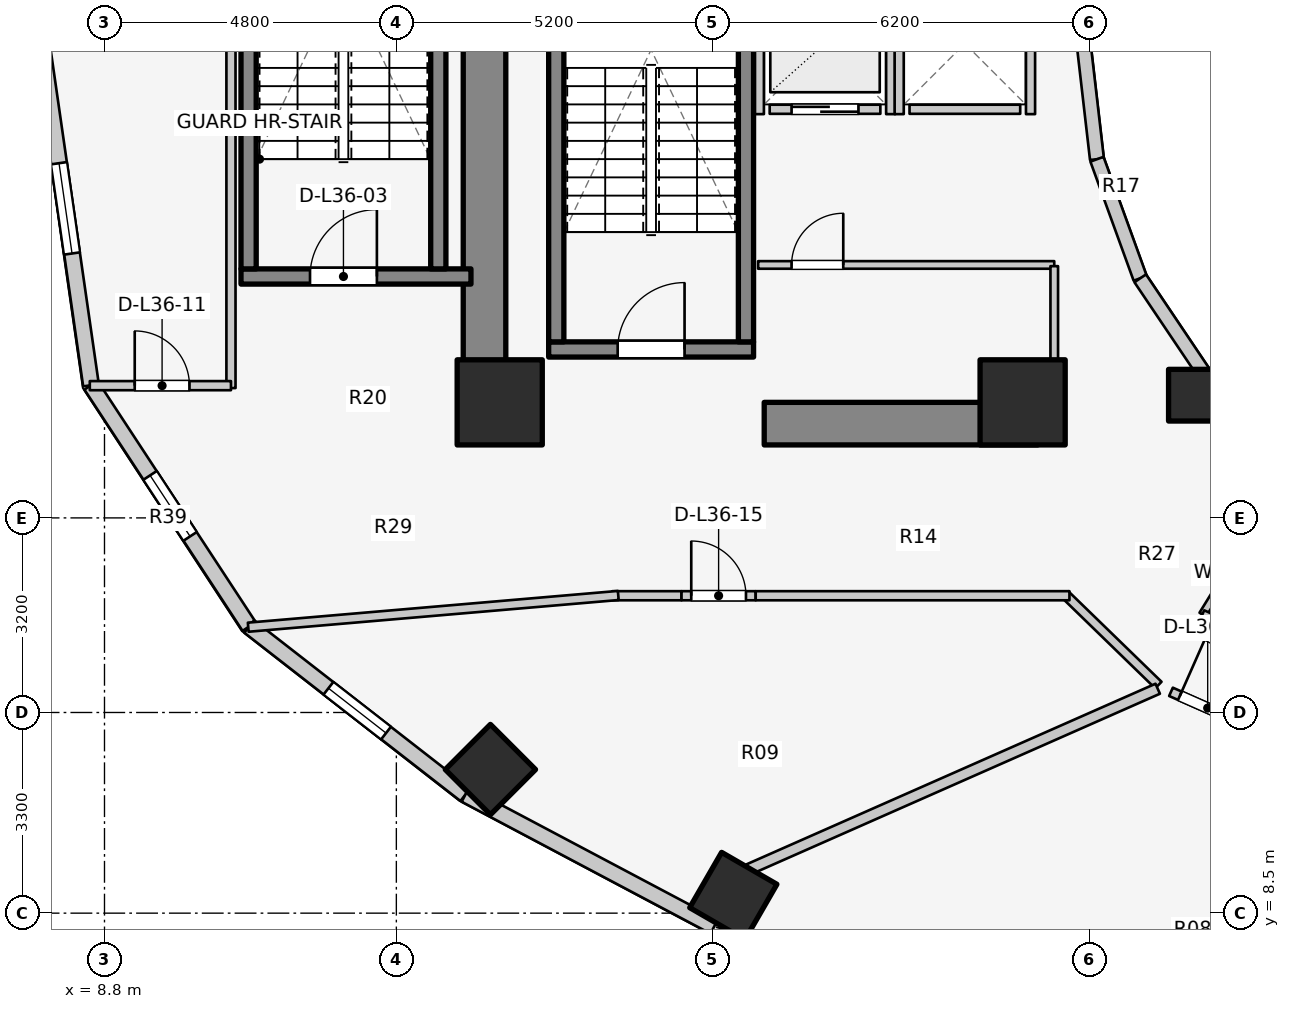
"""IFC4 building model, lengths in metres.
Left out: names, types, materials, properties, quantities, classifications, styles, units other than length and angle.
Written with IfcOpenShell. Run it as: python <this file> out.ifc"""

import sys

from ifc_helpers import new_model, si_unit, direction, frame, frame_2d, origin, origin_2d, place, context, subcontext, project, spatial, rectangle, extrude, element, fill, save


model = new_model("IFC4")
c1 = context("Model", 3, precision=1e-05, world=origin(), true_north=direction((0.0, 1.0)))
c2 = subcontext(c1, "Body", "Model", "MODEL_VIEW")
j1 = project(units=[si_unit("LENGTHUNIT", "METRE"), si_unit("PLANEANGLEUNIT", "RADIAN")], contexts=[c1])
p1 = place(None, origin())
s1 = spatial("IfcSite", under=j1, at=p1, CompositionType="ELEMENT")
p2 = place(p1, origin())
s2 = spatial("IfcBuilding", under=s1, at=p2, CompositionType="ELEMENT")
p3 = place(p2, frame((0.0, 0.0, 119.7)))
s3 = spatial("IfcBuildingStorey", under=s2, at=p3, CompositionType="ELEMENT", Elevation=119.7)
p4 = place(p3, frame((15.05, 17.05, 0.0), z_axis=(0.0, 0.0, 1.0), x_axis=(0.0, 1.0, 0.0)))
e1 = element("IfcWall", 1, at=p4, inside=s3, PredefinedType="SHEAR", context=c2, shape_type="SweptSolid", body=[
    extrude(rectangle(XDim=12.8, YDim=0.7, at=frame_2d((6.4, 0.0))), origin(), (0.0, 0.0, 1.0), 3.1),
])
p5 = place(p3, frame((19.65, 16.55, 0.0), z_axis=(0.0, 0.0, 1.0), x_axis=(1.0, 0.0, 0.0)))
e2 = element("IfcWall", 2, at=p5, inside=s3, PredefinedType="SHEAR", context=c2, shape_type="SweptSolid", body=[
    extrude(rectangle(XDim=4.5, YDim=0.7, at=frame_2d((2.25, 0.0))), origin(), (0.0, 0.0, 1.0), 3.1),
])
p6 = place(p3, frame((16.105, 17.77, 0.0), z_axis=(0.0, 0.0, 1.0), x_axis=(1.0, 0.0, 0.0)))
e3 = element("IfcWall", 3, at=p6, inside=s3, PredefinedType="SOLIDWALL", context=c2, shape_type="SweptSolid", body=[
    extrude(rectangle(XDim=3.37, YDim=0.25, at=frame_2d((1.685, 0.0))), origin(), (0.0, 0.0, 1.0), 3.1),
])
p7 = place(p6, frame((1.135, 0.0, 0.0)))
e4 = element("IfcOpeningElement", 4, at=p7, cuts=e3, PredefinedType="OPENING", context=c2, shape_type="SweptSolid", body=[
    extrude(rectangle(XDim=1.1, YDim=2.1, at=frame_2d((0.55, 1.05))), frame((0.0, 0.135, 0.0), z_axis=(0.0, -1.0, 0.0), x_axis=(1.0, 0.0, 0.0)), (0.0, 0.0, 1.0), 0.27),
])
for number, where, z_axis, x_axis in (
    (5, (16.23, 17.895, 0.0), (0.0, 0.0, 1.0), (0.0, 1.0, 0.0)),
    (6, (19.35, 17.895, 0.0), (0.0, 0.0, 1.0), (0.0, 1.0, 0.0)),
):
    element("IfcWall", number, at=place(p3, frame(where, z_axis=z_axis, x_axis=x_axis)), inside=s3, PredefinedType="SOLIDWALL", context=c2, shape_type="SweptSolid", body=[
        extrude(rectangle(XDim=7.81, YDim=0.25, at=frame_2d((3.905, 0.0))), origin(), (0.0, 0.0, 1.0), 3.1),
    ])
p8 = place(p3, frame((11.045, 18.97, 0.0), z_axis=(0.0, 0.0, 1.0), x_axis=(1.0, 0.0, 0.0)))
e7 = element("IfcWall", 7, at=p8, inside=s3, PredefinedType="SOLIDWALL", context=c2, shape_type="SweptSolid", body=[
    extrude(rectangle(XDim=3.782, YDim=0.25, at=frame_2d((1.891, 0.0))), origin(), (0.0, 0.0, 1.0), 3.1),
])
p9 = place(p8, frame((1.135, 0.0, 0.0)))
e8 = element("IfcOpeningElement", 8, at=p9, cuts=e7, PredefinedType="OPENING", context=c2, shape_type="SweptSolid", body=[
    extrude(rectangle(XDim=1.1, YDim=2.1, at=frame_2d((0.55, 1.05))), frame((0.0, 0.135, 0.0), z_axis=(0.0, -1.0, 0.0), x_axis=(1.0, 0.0, 0.0)), (0.0, 0.0, 1.0), 0.27),
])
for number, where, z_axis, x_axis in (
    (9, (11.17, 19.095, 0.0), (0.0, 0.0, 1.0), (0.0, 1.0, 0.0)),
    (10, (14.29, 19.095, 0.0), (0.0, 0.0, 1.0), (0.0, 1.0, 0.0)),
):
    element("IfcWall", number, at=place(p3, frame(where, z_axis=z_axis, x_axis=x_axis)), inside=s3, PredefinedType="SOLIDWALL", context=c2, shape_type="SweptSolid", body=[
        extrude(rectangle(XDim=7.81, YDim=0.25, at=frame_2d((3.905, 0.0))), origin(), (0.0, 0.0, 1.0), 3.1),
    ])
for number, where, z_axis, x_axis in (
    (11, (15.3, 16.9, 0.0), (0.0, 0.0, 1.0), (1.0, 0.0, 0.0)),
    (12, (23.9, 16.9, 0.0), (0.0, 0.0, 1.0), (1.0, 0.0, 0.0)),
):
    element("IfcColumn", number, at=place(p3, frame(where, z_axis=z_axis, x_axis=x_axis)), inside=s3, PredefinedType="COLUMN", context=c2, shape_type="SweptSolid", body=[
        extrude(rectangle(XDim=1.4, YDim=1.4, at=origin_2d()), origin(), (0.0, 0.0, 1.0), 3.1),
    ])
p10 = place(p3, frame((26.725, 17.018, 0.0), z_axis=(0.0, 0.0, 1.0), x_axis=(1.0, 0.0, 0.0)))
e13 = element("IfcColumn", 13, at=p10, inside=s3, PredefinedType="COLUMN", context=c2, shape_type="SweptSolid", body=[
    extrude(rectangle(XDim=0.85, YDim=0.85, at=origin_2d()), origin(), (0.0, 0.0, 1.0), 3.1),
])
for number, where, z_axis, x_axis in (
    (14, (15.147, 10.862, 0.0), (0.0, 0.0, 1.0), (-0.707, -0.707, 0.0)),
    (15, (19.142, 8.782, 0.0), (0.0, 0.0, 1.0), (-0.5, -0.866, 0.0)),
):
    element("IfcColumn", number, at=place(p3, frame(where, z_axis=z_axis, x_axis=x_axis)), inside=s3, PredefinedType="COLUMN", context=c2, shape_type="SweptSolid", body=[
        extrude(rectangle(XDim=1.05, YDim=1.05, at=origin_2d()), origin(), (0.0, 0.0, 1.0), 3.1),
    ])
p11 = place(p3, frame((24.88, 23.0, 0.0), z_axis=(0.0, 0.0, 1.0), x_axis=(0.114711713601, -0.993398823617, 0.0)))
e16 = element("IfcWall", 16, at=p11, inside=s3, PredefinedType="STANDARD", context=c2, shape_type="SweptSolid", body=[
    extrude(rectangle(XDim=2.115, YDim=0.23, at=frame_2d((1.058, 0.0))), origin(), (0.0, 0.0, 1.0), 2.56),
])
p12 = place(p3, frame((25.123, 20.898, 0.0), z_axis=(0.0, 0.0, 1.0), x_axis=(0.341423187295, -0.93990968033, 0.0)))
e17 = element("IfcWall", 17, at=p12, inside=s3, PredefinedType="STANDARD", context=c2, shape_type="SweptSolid", body=[
    extrude(rectangle(XDim=2.084, YDim=0.23, at=frame_2d((1.042, 0.0))), origin(), (0.0, 0.0, 1.0), 2.56),
])
p13 = place(p3, frame((25.834, 18.94, 0.0), z_axis=(0.0, 0.0, 1.0), x_axis=(0.558197800898, -0.829707909492, 0.0)))
e18 = element("IfcWall", 18, at=p13, inside=s3, PredefinedType="STANDARD", context=c2, shape_type="SweptSolid", body=[
    extrude(rectangle(XDim=2.027, YDim=0.23, at=frame_2d((1.013, 0.0))), origin(), (0.0, 0.0, 1.0), 1.22),
])
p14 = place(p3, frame((26.965, 17.258, 0.0), z_axis=(0.0, 0.0, 1.0), x_axis=(0.752576694707, -0.658504607869, 0.0)))
e19 = element("IfcWall", 19, at=p14, inside=s3, PredefinedType="STANDARD", context=c2, shape_type="SweptSolid", body=[
    extrude(rectangle(XDim=1.959, YDim=0.23, at=frame_2d((0.98, 0.0))), origin(), (0.0, 0.0, 1.0), 1.22),
])
p15 = place(p3, frame((7.74, 23.0, 0.0), z_axis=(0.0, 0.0, 1.0), x_axis=(0.142572472068, -0.98978436551, 0.0)))
e20 = element("IfcWall", 20, at=p15, inside=s3, PredefinedType="STANDARD", context=c2, shape_type="SweptSolid", body=[
    extrude(rectangle(XDim=5.879, YDim=0.26, at=frame_2d((2.939, 0.0))), origin(), (0.0, 0.0, 1.0), 2.57),
])
p16 = place(p15, frame((2.189, 0.0, 0.75)))
e21 = element("IfcOpeningElement", 21, at=p16, cuts=e20, PredefinedType="OPENING", context=c2, shape_type="SweptSolid", body=[
    extrude(rectangle(XDim=1.5, YDim=1.6, at=frame_2d((0.75, 0.8))), frame((0.0, 0.14, 0.0), z_axis=(0.0, -1.0, 0.0), x_axis=(1.0, 0.0, 0.0)), (0.0, 0.0, 1.0), 0.28),
])
p17 = place(p3, frame((8.578, 17.181, 0.0), z_axis=(0.0, 0.0, 1.0), x_axis=(0.548283220945, -0.836292717672, 0.0)))
e22 = element("IfcWall", 22, at=p17, inside=s3, PredefinedType="STANDARD", context=c2, shape_type="SweptSolid", body=[
    extrude(rectangle(XDim=4.744, YDim=0.26, at=frame_2d((2.372, 0.0))), origin(), (0.0, 0.0, 1.0), 1.22),
])
p18 = place(p17, frame((1.772, 0.0, 0.15)))
e23 = element("IfcOpeningElement", 23, at=p18, cuts=e22, PredefinedType="OPENING", context=c2, shape_type="SweptSolid", body=[
    extrude(rectangle(XDim=1.2, YDim=0.9, at=frame_2d((0.6, 0.45))), frame((0.0, 0.14, 0.0), z_axis=(0.0, -1.0, 0.0), x_axis=(1.0, 0.0, 0.0)), (0.0, 0.0, 1.0), 0.28),
])
p19 = place(p3, frame((11.179, 13.214, 0.0), z_axis=(0.0, 0.0, 1.0), x_axis=(0.789127449954, -0.614229491094, 0.0)))
e24 = element("IfcWall", 24, at=p19, inside=s3, PredefinedType="STANDARD", context=c2, shape_type="SweptSolid", body=[
    extrude(rectangle(XDim=4.505, YDim=0.26, at=frame_2d((2.252, 0.0))), origin(), (0.0, 0.0, 1.0), 1.22),
])
p20 = place(p19, frame((1.652, 0.0, 0.15)))
e25 = element("IfcOpeningElement", 25, at=p20, cuts=e24, PredefinedType="OPENING", context=c2, shape_type="SweptSolid", body=[
    extrude(rectangle(XDim=1.2, YDim=0.9, at=frame_2d((0.6, 0.45))), frame((0.0, 0.14, 0.0), z_axis=(0.0, -1.0, 0.0), x_axis=(1.0, 0.0, 0.0)), (0.0, 0.0, 1.0), 0.28),
])
p21 = place(p3, frame((14.734, 10.447, 0.0), z_axis=(0.0, 0.0, 1.0), x_axis=(0.883668636807, -0.4681129568, 0.0)))
e26 = element("IfcWall", 26, at=p21, inside=s3, PredefinedType="STANDARD", context=c2, shape_type="SweptSolid", body=[
    extrude(rectangle(XDim=4.631, YDim=0.26, at=frame_2d((2.316, 0.0))), origin(), (0.0, 0.0, 1.0), 1.22),
])
p22 = place(p3, frame((19.74, 21.72, 0.0), z_axis=(0.0, 0.0, 1.0), x_axis=(1.0, 0.0, 0.0)))
e27 = element("IfcWall", 27, at=p22, inside=s3, PredefinedType="SOLIDWALL", context=c2, shape_type="SweptSolid", body=[
    extrude(rectangle(XDim=1.82, YDim=0.15, at=frame_2d((0.91, 0.0))), origin(), (0.0, 0.0, 1.0), 2.575),
])
p23 = place(p22, frame((0.36, 0.0, 0.0)))
e28 = element("IfcOpeningElement", 28, at=p23, cuts=e27, PredefinedType="OPENING", context=c2, shape_type="SweptSolid", body=[
    extrude(rectangle(XDim=1.1, YDim=2.1, at=frame_2d((0.55, 1.05))), frame((0.0, 0.085, 0.0), z_axis=(0.0, -1.0, 0.0), x_axis=(1.0, 0.0, 0.0)), (0.0, 0.0, 1.0), 0.17),
])
for number, where, z_axis, x_axis in (
    (29, (19.57, 21.64, 0.0), (0.0, 0.0, 1.0), (0.0, 1.0, 0.0)),
    (30, (21.73, 21.64, 0.0), (0.0, 0.0, 1.0), (0.0, 1.0, 0.0)),
):
    element("IfcWall", number, at=place(p3, frame(where, z_axis=z_axis, x_axis=x_axis)), inside=s3, PredefinedType="SOLIDWALL", context=c2, shape_type="SweptSolid", body=[
        extrude(rectangle(XDim=2.32, YDim=0.15, at=frame_2d((1.16, 0.0))), origin(), (0.0, 0.0, 1.0), 2.575),
    ])
p24 = place(p3, frame((22.04, 21.72, 0.0), z_axis=(0.0, 0.0, 1.0), x_axis=(1.0, 0.0, 0.0)))
e31 = element("IfcWall", 31, at=p24, inside=s3, PredefinedType="SOLIDWALL", context=c2, shape_type="SweptSolid", body=[
    extrude(rectangle(XDim=1.82, YDim=0.15, at=frame_2d((0.91, 0.0))), origin(), (0.0, 0.0, 1.0), 2.12),
])
p25 = place(p3, frame((21.87, 21.64, 0.0), z_axis=(0.0, 0.0, 1.0), x_axis=(0.0, 1.0, 0.0)))
e32 = element("IfcWall", 32, at=p25, inside=s3, PredefinedType="SOLIDWALL", context=c2, shape_type="SweptSolid", body=[
    extrude(rectangle(XDim=2.32, YDim=0.15, at=frame_2d((1.16, 0.0))), origin(), (0.0, 0.0, 1.0), 2.575),
])
p26 = place(p3, frame((24.03, 21.64, 0.0), z_axis=(0.0, 0.0, 1.0), x_axis=(0.0, 1.0, 0.0)))
e33 = element("IfcWall", 33, at=p26, inside=s3, PredefinedType="SOLIDWALL", context=c2, shape_type="SweptSolid", body=[
    extrude(rectangle(XDim=2.32, YDim=0.15, at=frame_2d((1.16, 0.0))), origin(), (0.0, 0.0, 1.0), 2.12),
])
p27 = place(p3, frame((19.55, 19.16, 0.0), z_axis=(0.0, 0.0, 1.0), x_axis=(1.0, 0.0, 0.0)))
e34 = element("IfcWall", 34, at=p27, inside=s3, PredefinedType="PARTITIONING", context=c2, shape_type="SweptSolid", body=[
    extrude(rectangle(XDim=4.87, YDim=0.125, at=frame_2d((2.435, 0.0))), origin(), (0.0, 0.0, 1.0), 2.12),
])
p28 = place(p27, frame((0.55, 0.0, 0.0)))
e35 = element("IfcOpeningElement", 35, at=p28, cuts=e34, PredefinedType="OPENING", context=c2, shape_type="SweptSolid", body=[
    extrude(rectangle(XDim=0.85, YDim=2.05, at=frame_2d((0.425, 1.025))), frame((0.0, 0.073, 0.0), z_axis=(0.0, -1.0, 0.0), x_axis=(1.0, 0.0, 0.0)), (0.0, 0.0, 1.0), 0.145),
])
p29 = place(p3, frame((24.42, 17.1, 0.0), z_axis=(0.0, 0.0, 1.0), x_axis=(0.0, 1.0, 0.0)))
e36 = element("IfcWall", 36, at=p29, inside=s3, PredefinedType="PARTITIONING", context=c2, shape_type="SweptSolid", body=[
    extrude(rectangle(XDim=2.04, YDim=0.125, at=frame_2d((1.02, 0.0))), origin(), (0.0, 0.0, 1.0), 1.873),
])
p30 = place(p3, frame((10.88, 17.135, 0.0), z_axis=(0.0, 0.0, 1.0), x_axis=(0.0, 1.0, 0.0)))
e37 = element("IfcWall", 37, at=p30, inside=s3, PredefinedType="PARTITIONING", context=c2, shape_type="SweptSolid", body=[
    extrude(rectangle(XDim=11.73, YDim=0.15, at=frame_2d((5.865, 0.0))), origin(), (0.0, 0.0, 1.0), 2.12),
])
p31 = place(p3, frame((8.558, 17.175, 0.0), z_axis=(0.0, 0.0, 1.0), x_axis=(1.0, 0.0, 0.0)))
e38 = element("IfcWall", 38, at=p31, inside=s3, PredefinedType="PARTITIONING", context=c2, shape_type="SweptSolid", body=[
    extrude(rectangle(XDim=2.322, YDim=0.15, at=frame_2d((1.161, 0.0))), origin(), (0.0, 0.0, 1.0), 2.575),
])
p32 = place(p31, frame((0.739, 0.0, 0.0)))
e39 = element("IfcOpeningElement", 39, at=p32, cuts=e38, PredefinedType="OPENING", context=c2, shape_type="SweptSolid", body=[
    extrude(rectangle(XDim=0.9, YDim=2.1, at=frame_2d((0.45, 1.05))), frame((0.0, 0.085, 0.0), z_axis=(0.0, -1.0, 0.0), x_axis=(1.0, 0.0, 0.0)), (0.0, 0.0, 1.0), 0.17),
])
p33 = place(p3, frame((26.133, 12.251, 0.0), z_axis=(0.0, 0.0, 1.0), x_axis=(-0.717419568599, 0.696641344302, 0.0)))
e40 = element("IfcWall", 40, at=p33, inside=s3, PredefinedType="PARTITIONING", context=c2, shape_type="SweptSolid", body=[
    extrude(rectangle(XDim=2.138, YDim=0.15, at=frame_2d((1.069, 0.0))), origin(), (0.0, 0.0, 1.0), 1.992),
])
p34 = place(p3, frame((17.15, 13.72, 0.0), z_axis=(0.0, 0.0, 1.0), x_axis=(1.0, 0.0, 0.0)))
e41 = element("IfcWall", 41, at=p34, inside=s3, PredefinedType="PARTITIONING", context=c2, shape_type="SweptSolid", body=[
    extrude(rectangle(XDim=1.14, YDim=0.15, at=frame_2d((0.57, 0.0))), origin(), (0.0, 0.0, 1.0), 2.575),
])
p35 = place(p3, frame((18.29, 13.72, 0.0), z_axis=(0.0, 0.0, 1.0), x_axis=(1.0, 0.0, 0.0)))
e42 = element("IfcWall", 42, at=p35, inside=s3, PredefinedType="PARTITIONING", context=c2, shape_type="SweptSolid", body=[
    extrude(rectangle(XDim=1.22, YDim=0.15, at=frame_2d((0.61, 0.0))), origin(), (0.0, 0.0, 1.0), 2.575),
])
p36 = place(p35, frame((0.16, 0.0, 0.0)))
e43 = element("IfcOpeningElement", 43, at=p36, cuts=e42, PredefinedType="OPENING", context=c2, shape_type="SweptSolid", body=[
    extrude(rectangle(XDim=0.9, YDim=2.1, at=frame_2d((0.45, 1.05))), frame((0.0, 0.085, 0.0), z_axis=(0.0, -1.0, 0.0), x_axis=(1.0, 0.0, 0.0)), (0.0, 0.0, 1.0), 0.17),
])
p37 = place(p3, frame((19.51, 13.72, 0.0), z_axis=(0.0, 0.0, 1.0), x_axis=(1.0, 0.0, 0.0)))
e44 = element("IfcWall", 44, at=p37, inside=s3, PredefinedType="PARTITIONING", context=c2, shape_type="SweptSolid", body=[
    extrude(rectangle(XDim=5.16, YDim=0.15, at=frame_2d((2.58, 0.0))), origin(), (0.0, 0.0, 1.0), 1.992),
])
p38 = place(p3, frame((17.25, 13.724, 0.0), z_axis=(0.0, 0.0, 1.0), x_axis=(-0.996341886029, -0.085456691633, 0.0)))
e45 = element("IfcWall", 45, at=p38, inside=s3, PredefinedType="PARTITIONING", context=c2, shape_type="SweptSolid", body=[
    extrude(rectangle(XDim=6.108, YDim=0.15, at=frame_2d((3.054, 0.0))), origin(), (0.0, 0.0, 1.0), 1.22),
])
p39 = place(p3, frame((28.45, 15.985, 0.0), z_axis=(0.0, 0.0, 1.0), x_axis=(-0.524565340045, -0.851370192116, 0.0)))
e46 = element("IfcWall", 46, at=p39, inside=s3, PredefinedType="PARTITIONING", context=c2, shape_type="SweptSolid", body=[
    extrude(rectangle(XDim=3.027, YDim=0.125, at=frame_2d((1.514, 0.0))), origin(), (0.0, 0.0, 1.0), 1.992),
])
p40 = place(p3, frame((26.856, 13.412, 0.0), z_axis=(0.0, 0.0, 1.0), x_axis=(0.912985265053, -0.407992531545, 0.0)))
e47 = element("IfcWall", 47, at=p40, inside=s3, PredefinedType="PARTITIONING", context=c2, shape_type="SweptSolid", body=[
    extrude(rectangle(XDim=2.723, YDim=0.15, at=frame_2d((1.362, 0.0))), origin(), (0.0, 0.0, 1.0), 1.992),
])
p41 = place(p3, frame((26.122, 12.191, 0.0), z_axis=(0.0, 0.0, 1.0), x_axis=(-0.914765930761, -0.403984271872, 0.0)))
e48 = element("IfcWall", 48, at=p41, inside=s3, PredefinedType="PARTITIONING", context=c2, shape_type="SweptSolid", body=[
    extrude(rectangle(XDim=7.354, YDim=0.18, at=frame_2d((3.677, 0.0))), origin(), (0.0, 0.0, 1.0), 1.22),
])
p42 = place(p3, frame((26.34, 12.14, 0.0), z_axis=(0.0, 0.0, 1.0), x_axis=(0.914481389177, -0.404627963503, 0.0)))
e49 = element("IfcWall", 49, at=p42, inside=s3, PredefinedType="PARTITIONING", context=c2, shape_type="SweptSolid", body=[
    extrude(rectangle(XDim=1.32, YDim=0.15, at=frame_2d((0.66, 0.0))), origin(), (0.0, 0.0, 1.0), 2.16),
])
p43 = place(p42, frame((0.16, 0.0, 0.0)))
e50 = element("IfcOpeningElement", 50, at=p43, cuts=e49, PredefinedType="OPENING", context=c2, shape_type="SweptSolid", body=[
    extrude(rectangle(XDim=1.0, YDim=2.1, at=frame_2d((0.5, 1.05))), frame((0.0, 0.085, 0.0), z_axis=(0.0, -1.0, 0.0), x_axis=(1.0, 0.0, 0.0)), (0.0, 0.0, 1.0), 0.17),
])
p44 = place(p16, origin())
e51 = element("IfcWindow", 51, at=p44, inside=s3, PartitioningType="SINGLE_PANEL", PredefinedType="WINDOW", context=c2, shape_type="SweptSolid", body=[
    extrude(rectangle(XDim=1.5, YDim=1.6, at=frame_2d((0.75, 0.8))), frame((0.0, 0.03, 0.0), z_axis=(0.0, -1.0, 0.0), x_axis=(1.0, 0.0, 0.0)), (0.0, 0.0, 1.0), 0.06),
])
fill(e21, e51)
p45 = place(p18, origin())
e52 = element("IfcWindow", 52, at=p45, inside=s3, PartitioningType="SINGLE_PANEL", PredefinedType="WINDOW", context=c2, shape_type="SweptSolid", body=[
    extrude(rectangle(XDim=1.2, YDim=0.9, at=frame_2d((0.6, 0.45))), frame((0.0, 0.03, 0.0), z_axis=(0.0, -1.0, 0.0), x_axis=(1.0, 0.0, 0.0)), (0.0, 0.0, 1.0), 0.06),
])
fill(e23, e52)
p46 = place(p20, origin())
e53 = element("IfcWindow", 53, at=p46, inside=s3, PartitioningType="SINGLE_PANEL", PredefinedType="WINDOW", context=c2, shape_type="SweptSolid", body=[
    extrude(rectangle(XDim=1.2, YDim=0.9, at=frame_2d((0.6, 0.45))), frame((0.0, 0.03, 0.0), z_axis=(0.0, -1.0, 0.0), x_axis=(1.0, 0.0, 0.0)), (0.0, 0.0, 1.0), 0.06),
])
fill(e25, e53)
p47 = place(p7, origin())
e54 = element("IfcDoor", 54, at=p47, inside=s3, OperationType="SINGLE_SWING_RIGHT", PredefinedType="DOOR", context=c2, shape_type="SweptSolid", body=[
    extrude(rectangle(XDim=1.1, YDim=2.1, at=frame_2d((0.55, 1.05))), frame((0.0, 0.025, 0.0), z_axis=(0.0, -1.0, 0.0), x_axis=(1.0, 0.0, 0.0)), (0.0, 0.0, 1.0), 0.05),
])
fill(e4, e54)
p48 = place(p9, origin())
e55 = element("IfcDoor", 55, at=p48, inside=s3, OperationType="SINGLE_SWING_RIGHT", PredefinedType="DOOR", context=c2, shape_type="SweptSolid", body=[
    extrude(rectangle(XDim=1.1, YDim=2.1, at=frame_2d((0.55, 1.05))), frame((0.0, 0.025, 0.0), z_axis=(0.0, -1.0, 0.0), x_axis=(1.0, 0.0, 0.0)), (0.0, 0.0, 1.0), 0.05),
])
fill(e8, e55)
p49 = place(p23, origin())
e56 = element("IfcDoor", 56, at=p49, inside=s3, OperationType="DOUBLE_DOOR_SLIDING", PredefinedType="DOOR", context=c2, shape_type="SweptSolid", body=[
    extrude(rectangle(XDim=1.1, YDim=2.1, at=frame_2d((0.55, 1.05))), frame((0.0, 0.025, 0.0), z_axis=(0.0, -1.0, 0.0), x_axis=(1.0, 0.0, 0.0)), (0.0, 0.0, 1.0), 0.05),
])
fill(e28, e56)
p50 = place(p28, origin())
e57 = element("IfcDoor", 57, at=p50, inside=s3, OperationType="SINGLE_SWING_RIGHT", PredefinedType="DOOR", context=c2, shape_type="SweptSolid", body=[
    extrude(rectangle(XDim=0.85, YDim=2.05, at=frame_2d((0.425, 1.025))), frame((0.0, 0.025, 0.0), z_axis=(0.0, -1.0, 0.0), x_axis=(1.0, 0.0, 0.0)), (0.0, 0.0, 1.0), 0.05),
])
fill(e35, e57)
p51 = place(p32, origin())
e58 = element("IfcDoor", 58, at=p51, inside=s3, OperationType="SINGLE_SWING_LEFT", PredefinedType="DOOR", context=c2, shape_type="SweptSolid", body=[
    extrude(rectangle(XDim=0.9, YDim=2.1, at=frame_2d((0.45, 1.05))), frame((0.0, 0.025, 0.0), z_axis=(0.0, -1.0, 0.0), x_axis=(1.0, 0.0, 0.0)), (0.0, 0.0, 1.0), 0.05),
])
fill(e39, e58)
p52 = place(p36, origin())
e59 = element("IfcDoor", 59, at=p52, inside=s3, OperationType="SINGLE_SWING_LEFT", PredefinedType="DOOR", context=c2, shape_type="SweptSolid", body=[
    extrude(rectangle(XDim=0.9, YDim=2.1, at=frame_2d((0.45, 1.05))), frame((0.0, 0.025, 0.0), z_axis=(0.0, -1.0, 0.0), x_axis=(1.0, 0.0, 0.0)), (0.0, 0.0, 1.0), 0.05),
])
fill(e43, e59)
p53 = place(p43, origin())
e60 = element("IfcDoor", 60, at=p53, inside=s3, OperationType="SINGLE_SWING_LEFT", PredefinedType="DOOR", context=c2, shape_type="SweptSolid", body=[
    extrude(rectangle(XDim=1.0, YDim=2.1, at=frame_2d((0.5, 1.05))), frame((0.0, 0.025, 0.0), z_axis=(0.0, -1.0, 0.0), x_axis=(1.0, 0.0, 0.0)), (0.0, 0.0, 1.0), 0.05),
])
fill(e50, e60)
save(model, sys.argv[1])
